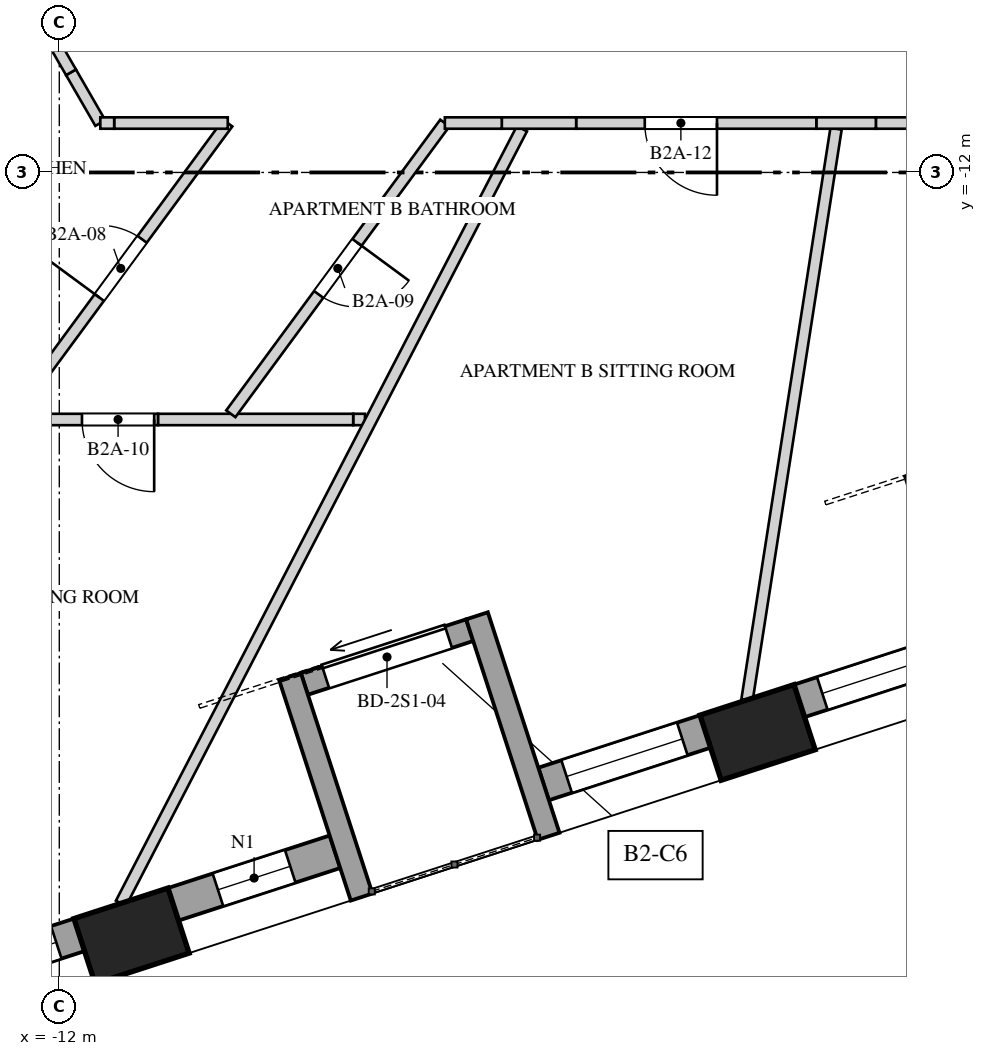
"""IFC4 building model, lengths in metres.
Left out: names, types, materials, properties, quantities, classifications, styles, units other than length and angle.
Written with IfcOpenShell. Run it as: python <this file> out.ifc"""

import sys

from ifc_helpers import new_model, si_unit, direction, frame, frame_2d, origin, origin_2d, place, context, subcontext, project, spatial, polyline, rectangle, outline, extrude, element, fill, save


model = new_model("IFC4")
c1 = context("Model", 3, precision=1e-05, world=origin(), true_north=direction((0.0, 1.0)))
c2 = subcontext(c1, "Body", "Model", "MODEL_VIEW")
j1 = project(units=[si_unit("LENGTHUNIT", "METRE"), si_unit("PLANEANGLEUNIT", "RADIAN")], contexts=[c1])
p1 = place(None, origin())
s1 = spatial("IfcSite", under=j1, at=p1, CompositionType="ELEMENT")
p2 = place(p1, origin())
s2 = spatial("IfcBuilding", under=s1, at=p2, CompositionType="ELEMENT")
p3 = place(p2, frame((0.0, 0.0, 88.4)))
s3 = spatial("IfcBuildingStorey", under=s2, at=p3, CompositionType="ELEMENT", Elevation=88.4)
for number, where, z_axis, x_axis in (
    (1, (-11.05, -22.043, -0.35), (0.0, 0.0, 1.0), (0.951, 0.309, 0.0)),
    (2, (-2.813, -19.367, -0.35), (0.0, 0.0, 1.0), (0.951, 0.309, 0.0)),
):
    element("IfcColumn", number, at=place(p3, frame(where, z_axis=z_axis, x_axis=x_axis)), inside=s3, PredefinedType="COLUMN", context=c2, shape_type="SweptSolid", body=[
        extrude(rectangle(XDim=1.3, YDim=0.9, at=origin_2d()), origin(), (0.0, 0.0, 1.0), 4.35),
    ])
p4 = place(p3, frame((-13.865, -22.721, 0.0), z_axis=(0.0, 0.0, 1.0), x_axis=(0.951057328329, 0.30901449518, 0.0)))
e3 = element("IfcWall", 3, at=p4, inside=s3, PredefinedType="SOLIDWALL", context=c2, shape_type="SweptSolid", body=[
    extrude(rectangle(XDim=2.237, YDim=0.45, at=frame_2d((1.118, 0.0))), origin(), (0.0, 0.0, 1.0), 3.3),
])
p5 = place(p4, frame((0.318, 0.0, 0.7)))
e4 = element("IfcOpeningElement", 4, at=p5, cuts=e3, PredefinedType="OPENING", context=c2, shape_type="SweptSolid", body=[
    extrude(rectangle(XDim=1.6, YDim=2.3, at=frame_2d((0.8, 1.15))), frame((0.0, 0.235, 0.0), z_axis=(0.0, -1.0, 0.0), x_axis=(1.0, 0.0, 0.0)), (0.0, 0.0, 1.0), 0.47),
])
p6 = place(p3, frame((-10.501, -21.628, 0.0), z_axis=(0.0, 0.0, 1.0), x_axis=(0.951067749801, 0.30898241906, 0.0)))
e5 = element("IfcWall", 5, at=p6, inside=s3, PredefinedType="SOLIDWALL", context=c2, shape_type="SweptSolid", body=[
    extrude(rectangle(XDim=2.237, YDim=0.45, at=frame_2d((1.118, 0.0))), origin(), (0.0, 0.0, 1.0), 3.3),
])
p7 = place(p6, frame((0.618, 0.0, 0.7)))
e6 = element("IfcOpeningElement", 6, at=p7, cuts=e5, PredefinedType="OPENING", context=c2, shape_type="SweptSolid", body=[
    extrude(rectangle(XDim=1.0, YDim=2.3, at=frame_2d((0.5, 1.15))), frame((0.0, 0.235, 0.0), z_axis=(0.0, -1.0, 0.0), x_axis=(1.0, 0.0, 0.0)), (0.0, 0.0, 1.0), 0.47),
])
p8 = place(p3, frame((-5.628, -20.045, 0.0), z_axis=(0.0, 0.0, 1.0), x_axis=(0.951057328329, 0.30901449518, 0.0)))
e7 = element("IfcWall", 7, at=p8, inside=s3, PredefinedType="SOLIDWALL", context=c2, shape_type="SweptSolid", body=[
    extrude(rectangle(XDim=2.237, YDim=0.45, at=frame_2d((1.118, 0.0))), origin(), (0.0, 0.0, 1.0), 3.3),
])
p9 = place(p8, frame((0.318, 0.0, 0.7)))
e8 = element("IfcOpeningElement", 8, at=p9, cuts=e7, PredefinedType="OPENING", context=c2, shape_type="SweptSolid", body=[
    extrude(rectangle(XDim=1.6, YDim=2.3, at=frame_2d((0.8, 1.15))), frame((0.0, 0.235, 0.0), z_axis=(0.0, -1.0, 0.0), x_axis=(1.0, 0.0, 0.0)), (0.0, 0.0, 1.0), 0.47),
])
p10 = place(p3, frame((-2.264, -18.952, 0.0), z_axis=(0.0, 0.0, 1.0), x_axis=(0.951057328329, 0.30901449518, 0.0)))
e9 = element("IfcWall", 9, at=p10, inside=s3, PredefinedType="SOLIDWALL", context=c2, shape_type="SweptSolid", body=[
    extrude(rectangle(XDim=2.237, YDim=0.45, at=frame_2d((1.118, 0.0))), origin(), (0.0, 0.0, 1.0), 3.3),
])
p11 = place(p10, frame((0.318, 0.0, 0.7)))
e10 = element("IfcOpeningElement", 10, at=p11, cuts=e9, PredefinedType="OPENING", context=c2, shape_type="SweptSolid", body=[
    extrude(rectangle(XDim=1.6, YDim=2.3, at=frame_2d((0.8, 1.15))), frame((0.0, 0.235, 0.0), z_axis=(0.0, -1.0, 0.0), x_axis=(1.0, 0.0, 0.0)), (0.0, 0.0, 1.0), 0.47),
])
p12 = place(p3, frame((-8.776, -18.729, 0.0), z_axis=(0.0, 0.0, 1.0), x_axis=(0.951068585107, 0.308979847923, 0.0)))
e11 = element("IfcWall", 11, at=p12, inside=s3, PredefinedType="SOLIDWALL", context=c2, shape_type="SweptSolid", body=[
    extrude(rectangle(XDim=2.287, YDim=0.3, at=frame_2d((1.143, 0.0))), origin(), (0.0, 0.0, 1.0), 3.3),
])
p13 = place(p12, frame((0.293, 0.0, 0.0)))
e12 = element("IfcOpeningElement", 12, at=p13, cuts=e11, PredefinedType="OPENING", context=c2, shape_type="SweptSolid", body=[
    extrude(rectangle(XDim=1.7, YDim=2.4, at=frame_2d((0.85, 1.2))), frame((0.0, 0.16, 0.0), z_axis=(0.0, -1.0, 0.0), x_axis=(1.0, 0.0, 0.0)), (0.0, 0.0, 1.0), 0.32),
])
p14 = place(p3, frame((-8.022, -21.533, 0.0), z_axis=(0.0, 0.0, 1.0), x_axis=(-0.308990138358, 0.951065241925, 0.0)))
e13 = element("IfcWall", 13, at=p14, inside=s3, PredefinedType="SOLIDWALL", context=c2, shape_type="SweptSolid", body=[
    extrude(rectangle(XDim=3.05, YDim=0.3, at=frame_2d((1.525, 0.0))), origin(), (0.0, 0.0, 1.0), 3.3),
])
for number, where, z_axis, x_axis in (
    (14, (-5.562, -20.734, 0.0), (0.0, 0.0, 1.0), (-0.309, 0.951, 0.0)),
    (15, (0.214, -18.857, 0.0), (0.0, 0.0, 1.0), (-0.309, 0.951, 0.0)),
):
    element("IfcWall", number, at=place(p3, frame(where, z_axis=z_axis, x_axis=x_axis)), inside=s3, PredefinedType="SOLIDWALL", context=c2, shape_type="SweptSolid", body=[
        extrude(rectangle(XDim=3.05, YDim=0.3, at=frame_2d((1.525, 0.0))), origin(), (0.0, 0.0, 1.0), 3.3),
    ])
p15 = place(p3, frame((-12.599, -15.175, 0.0), z_axis=(0.0, 0.0, 1.0), x_axis=(0.592829004129, 0.805328362758, 0.0)))
e16 = element("IfcWall", 16, at=p15, inside=s3, PredefinedType="PARTITIONING", context=c2, shape_type="SweptSolid", body=[
    extrude(rectangle(XDim=4.75, YDim=0.15, at=frame_2d((2.375, 0.0))), origin(), (0.0, 0.0, 1.0), 3.65),
])
p16 = place(p15, frame((1.9, 0.0, 0.0)))
e17 = element("IfcOpeningElement", 17, at=p16, cuts=e16, PredefinedType="OPENING", context=c2, shape_type="SweptSolid", body=[
    extrude(rectangle(XDim=0.95, YDim=2.4, at=frame_2d((0.475, 1.2))), frame((0.0, 0.085, 0.0), z_axis=(0.0, -1.0, 0.0), x_axis=(1.0, 0.0, 0.0)), (0.0, 0.0, 1.0), 0.17),
])
p17 = place(p3, frame((-11.46, -11.35, 0.0), z_axis=(0.0, 0.0, 1.0), x_axis=(-0.49974986996, 0.866169768276, 0.0)))
e18 = element("IfcWall", 18, at=p17, inside=s3, PredefinedType="PARTITIONING", context=c2, shape_type="SweptSolid", body=[
    extrude(rectangle(XDim=0.771, YDim=0.15, at=frame_2d((0.385, 0.0))), origin(), (0.0, 0.0, 1.0), 2.55),
])
p18 = place(p3, frame((-11.846, -10.682, 0.0), z_axis=(0.0, 0.0, 1.0), x_axis=(-0.500067425712, 0.865986472032, 0.0)))
e19 = element("IfcWall", 19, at=p18, inside=s3, PredefinedType="PARTITIONING", context=c2, shape_type="SweptSolid", body=[
    extrude(rectangle(XDim=2.226, YDim=0.15, at=frame_2d((1.113, 0.0))), origin(), (0.0, 0.0, 1.0), 3.65),
])
p19 = place(p3, frame((-9.784, -11.35, 0.0), z_axis=(0.0, 0.0, 1.0), x_axis=(-1.0, 0.0, 0.0)))
e20 = element("IfcWall", 20, at=p19, inside=s3, PredefinedType="PARTITIONING", context=c2, shape_type="SweptSolid", body=[
    extrude(rectangle(XDim=1.494, YDim=0.15, at=frame_2d((0.747, 0.0))), origin(), (0.0, 0.0, 1.0), 3.65),
])
p20 = place(p3, frame((-11.278, -11.35, 0.0), z_axis=(0.0, 0.0, 1.0), x_axis=(-1.0, 0.0, 0.0)))
e21 = element("IfcWall", 21, at=p20, inside=s3, PredefinedType="PARTITIONING", context=c2, shape_type="SweptSolid", body=[
    extrude(rectangle(XDim=0.182, YDim=0.15, at=frame_2d((0.091, 0.0))), origin(), (0.0, 0.0, 1.0), 2.55),
])
p21 = place(p3, frame((-7.978, -15.25, 0.0), z_axis=(0.0, 0.0, 1.0), x_axis=(-1.0, 0.0, 0.0)))
e22 = element("IfcWall", 22, at=p21, inside=s3, PredefinedType="PARTITIONING", context=c2, shape_type="SweptSolid", body=[
    extrude(rectangle(XDim=0.155, YDim=0.15, at=frame_2d((0.078, 0.0))), origin(), (0.0, 0.0, 1.0), 2.55),
])
p22 = place(p3, frame((-8.134, -15.25, 0.0), z_axis=(0.0, 0.0, 1.0), x_axis=(-1.0, 0.0, 0.0)))
e23 = element("IfcWall", 23, at=p22, inside=s3, PredefinedType="PARTITIONING", context=c2, shape_type="SweptSolid", body=[
    extrude(rectangle(XDim=2.568, YDim=0.15, at=frame_2d((1.284, 0.0))), origin(), (0.0, 0.0, 1.0), 3.65),
])
p23 = place(p3, frame((-10.702, -15.25, 0.0), z_axis=(0.0, 0.0, 1.0), x_axis=(-1.0, 0.0, 0.0)))
e24 = element("IfcWall", 24, at=p23, inside=s3, PredefinedType="PARTITIONING", context=c2, shape_type="SweptSolid", body=[
    extrude(outline(polyline([(0.0, 0.0), (1.601, 0.0), (1.601, 2.55), (0.497, 2.55), (0.497, 3.65), (0.0, 3.65), (0.0, 0.0)])), frame((0.0, 0.075, 0.0), z_axis=(0.0, -1.0, 0.0), x_axis=(1.0, 0.0, 0.0)), (0.0, 0.0, 1.0), 0.15),
])
p24 = place(p23, frame((0.05, 0.0, 0.0)))
e25 = element("IfcOpeningElement", 25, at=p24, cuts=e24, PredefinedType="OPENING", context=c2, shape_type="SweptSolid", body=[
    extrude(rectangle(XDim=0.95, YDim=2.4, at=frame_2d((0.475, 1.2))), frame((0.0, 0.085, 0.0), z_axis=(0.0, -1.0, 0.0), x_axis=(1.0, 0.0, 0.0)), (0.0, 0.0, 1.0), 0.17),
])
p25 = place(p3, frame((-6.927, -11.35, 0.0), z_axis=(0.0, 0.0, 1.0), x_axis=(-0.592862340114, -0.805303821967, 0.0)))
e26 = element("IfcWall", 26, at=p25, inside=s3, PredefinedType="PARTITIONING", context=c2, shape_type="SweptSolid", body=[
    extrude(rectangle(XDim=4.75, YDim=0.15, at=frame_2d((2.375, 0.0))), origin(), (0.0, 0.0, 1.0), 3.65),
])
p26 = place(p25, frame((1.95, 0.0, 0.0)))
e27 = element("IfcOpeningElement", 27, at=p26, cuts=e26, PredefinedType="OPENING", context=c2, shape_type="SweptSolid", body=[
    extrude(rectangle(XDim=0.85, YDim=2.4, at=frame_2d((0.425, 1.2))), frame((0.0, 0.085, 0.0), z_axis=(0.0, -1.0, 0.0), x_axis=(1.0, 0.0, 0.0)), (0.0, 0.0, 1.0), 0.17),
])
p27 = place(p3, frame((-5.914, -11.425, 0.0), z_axis=(0.0, 0.0, 1.0), x_axis=(-0.45968915988, -0.888079881705, 0.0)))
e28 = element("IfcWall", 28, at=p27, inside=s3, PredefinedType="PARTITIONING", context=c2, shape_type="SweptSolid", body=[
    extrude(rectangle(XDim=11.474, YDim=0.15, at=frame_2d((5.737, 0.0))), origin(), (0.0, 0.0, 1.0), 2.55),
])
p28 = place(p3, frame((-1.781, -11.425, 0.0), z_axis=(0.0, 0.0, 1.0), x_axis=(-0.153998853513, -0.988071026352, 0.0)))
e29 = element("IfcWall", 29, at=p28, inside=s3, PredefinedType="PARTITIONING", context=c2, shape_type="SweptSolid", body=[
    extrude(rectangle(XDim=7.605, YDim=0.15, at=frame_2d((3.802, 0.0))), origin(), (0.0, 0.0, 1.0), 2.75),
])
p29 = place(p3, frame((3.333, -11.35, 0.0), z_axis=(0.0, 0.0, 1.0), x_axis=(-1.0, 0.0, 0.0)))
e30 = element("IfcWall", 30, at=p29, inside=s3, PredefinedType="PARTITIONING", context=c2, shape_type="SweptSolid", body=[
    extrude(rectangle(XDim=4.59, YDim=0.15, at=frame_2d((2.295, 0.0))), origin(), (0.0, 0.0, 1.0), 3.65),
])
p30 = place(p29, frame((1.9, 0.0, 0.0)))
e31 = element("IfcOpeningElement", 31, at=p30, cuts=e30, PredefinedType="OPENING", context=c2, shape_type="SweptSolid", body=[
    extrude(rectangle(XDim=0.95, YDim=2.4, at=frame_2d((0.475, 1.2))), frame((0.0, 0.085, 0.0), z_axis=(0.0, -1.0, 0.0), x_axis=(1.0, 0.0, 0.0)), (0.0, 0.0, 1.0), 0.17),
])
p31 = place(p3, frame((-1.257, -11.35, 0.0), z_axis=(0.0, 0.0, 1.0), x_axis=(-1.0, 0.0, 0.0)))
e32 = element("IfcWall", 32, at=p31, inside=s3, PredefinedType="PARTITIONING", context=c2, shape_type="SweptSolid", body=[
    extrude(rectangle(XDim=0.783, YDim=0.15, at=frame_2d((0.392, 0.0))), origin(), (0.0, 0.0, 1.0), 2.75),
])
p32 = place(p3, frame((-2.04, -11.35, 0.0), z_axis=(0.0, 0.0, 1.0), x_axis=(-1.0, 0.0, 0.0)))
e33 = element("IfcWall", 33, at=p32, inside=s3, PredefinedType="PARTITIONING", context=c2, shape_type="SweptSolid", body=[
    extrude(rectangle(XDim=3.16, YDim=0.15, at=frame_2d((1.58, 0.0))), origin(), (0.0, 0.0, 1.0), 3.65),
])
p33 = place(p32, frame((1.307, 0.0, 0.0)))
e34 = element("IfcOpeningElement", 34, at=p33, cuts=e33, PredefinedType="OPENING", context=c2, shape_type="SweptSolid", body=[
    extrude(rectangle(XDim=0.95, YDim=2.4, at=frame_2d((0.475, 1.2))), frame((0.0, 0.085, 0.0), z_axis=(0.0, -1.0, 0.0), x_axis=(1.0, 0.0, 0.0)), (0.0, 0.0, 1.0), 0.17),
])
p34 = place(p3, frame((-5.2, -11.35, 0.0), z_axis=(0.0, 0.0, 1.0), x_axis=(-1.0, 0.0, 0.0)))
e35 = element("IfcWall", 35, at=p34, inside=s3, PredefinedType="PARTITIONING", context=c2, shape_type="SweptSolid", body=[
    extrude(rectangle(XDim=0.979, YDim=0.15, at=frame_2d((0.489, 0.0))), origin(), (0.0, 0.0, 1.0), 2.55),
])
p35 = place(p3, frame((-6.179, -11.35, 0.0), z_axis=(0.0, 0.0, 1.0), x_axis=(-1.0, 0.0, 0.0)))
e36 = element("IfcWall", 36, at=p35, inside=s3, PredefinedType="PARTITIONING", context=c2, shape_type="SweptSolid", body=[
    extrude(rectangle(XDim=0.749, YDim=0.15, at=frame_2d((0.375, 0.0))), origin(), (0.0, 0.0, 1.0), 3.65),
])
p36 = place(p5, origin())
e37 = element("IfcWindow", 37, at=p36, inside=s3, PartitioningType="SINGLE_PANEL", PredefinedType="WINDOW", context=c2, shape_type="SweptSolid", body=[
    extrude(rectangle(XDim=1.6, YDim=2.3, at=frame_2d((0.8, 1.15))), frame((0.0, 0.03, 0.0), z_axis=(0.0, -1.0, 0.0), x_axis=(1.0, 0.0, 0.0)), (0.0, 0.0, 1.0), 0.06),
])
fill(e4, e37)
p37 = place(p7, origin())
e38 = element("IfcWindow", 38, at=p37, inside=s3, PartitioningType="SINGLE_PANEL", PredefinedType="WINDOW", context=c2, shape_type="SweptSolid", body=[
    extrude(rectangle(XDim=1.0, YDim=2.3, at=frame_2d((0.5, 1.15))), frame((0.0, 0.03, 0.0), z_axis=(0.0, -1.0, 0.0), x_axis=(1.0, 0.0, 0.0)), (0.0, 0.0, 1.0), 0.06),
])
fill(e6, e38)
p38 = place(p9, origin())
e39 = element("IfcWindow", 39, at=p38, inside=s3, PartitioningType="SINGLE_PANEL", PredefinedType="WINDOW", context=c2, shape_type="SweptSolid", body=[
    extrude(rectangle(XDim=1.6, YDim=2.3, at=frame_2d((0.8, 1.15))), frame((0.0, 0.03, 0.0), z_axis=(0.0, -1.0, 0.0), x_axis=(1.0, 0.0, 0.0)), (0.0, 0.0, 1.0), 0.06),
])
fill(e8, e39)
p39 = place(p11, origin())
e40 = element("IfcWindow", 40, at=p39, inside=s3, PartitioningType="SINGLE_PANEL", PredefinedType="WINDOW", context=c2, shape_type="SweptSolid", body=[
    extrude(rectangle(XDim=1.6, YDim=2.3, at=frame_2d((0.8, 1.15))), frame((0.0, 0.03, 0.0), z_axis=(0.0, -1.0, 0.0), x_axis=(1.0, 0.0, 0.0)), (0.0, 0.0, 1.0), 0.06),
])
fill(e10, e40)
p40 = place(p13, origin())
e41 = element("IfcDoor", 41, at=p40, inside=s3, OperationType="SLIDING_TO_LEFT", PredefinedType="DOOR", context=c2, shape_type="SweptSolid", body=[
    extrude(rectangle(XDim=1.7, YDim=2.4, at=frame_2d((0.85, 1.2))), frame((0.0, 0.025, 0.0), z_axis=(0.0, -1.0, 0.0), x_axis=(1.0, 0.0, 0.0)), (0.0, 0.0, 1.0), 0.05),
])
fill(e12, e41)
p41 = place(p16, origin())
e42 = element("IfcDoor", 42, at=p41, inside=s3, OperationType="SINGLE_SWING_RIGHT", PredefinedType="DOOR", context=c2, shape_type="SweptSolid", body=[
    extrude(rectangle(XDim=0.95, YDim=2.4, at=frame_2d((0.475, 1.2))), frame((0.0, 0.025, 0.0), z_axis=(0.0, -1.0, 0.0), x_axis=(1.0, 0.0, 0.0)), (0.0, 0.0, 1.0), 0.05),
])
fill(e17, e42)
p42 = place(p26, origin())
e43 = element("IfcDoor", 43, at=p42, inside=s3, OperationType="SINGLE_SWING_LEFT", PredefinedType="DOOR", context=c2, shape_type="SweptSolid", body=[
    extrude(rectangle(XDim=0.85, YDim=2.4, at=frame_2d((0.425, 1.2))), frame((0.0, 0.025, 0.0), z_axis=(0.0, -1.0, 0.0), x_axis=(1.0, 0.0, 0.0)), (0.0, 0.0, 1.0), 0.05),
])
fill(e27, e43)
p43 = place(p24, origin())
e44 = element("IfcDoor", 44, at=p43, inside=s3, OperationType="SINGLE_SWING_RIGHT", PredefinedType="DOOR", context=c2, shape_type="SweptSolid", body=[
    extrude(rectangle(XDim=0.95, YDim=2.4, at=frame_2d((0.475, 1.2))), frame((0.0, 0.025, 0.0), z_axis=(0.0, -1.0, 0.0), x_axis=(1.0, 0.0, 0.0)), (0.0, 0.0, 1.0), 0.05),
])
fill(e25, e44)
p44 = place(p33, origin())
e45 = element("IfcDoor", 45, at=p44, inside=s3, OperationType="SINGLE_SWING_RIGHT", PredefinedType="DOOR", context=c2, shape_type="SweptSolid", body=[
    extrude(rectangle(XDim=0.95, YDim=2.4, at=frame_2d((0.475, 1.2))), frame((0.0, 0.025, 0.0), z_axis=(0.0, -1.0, 0.0), x_axis=(1.0, 0.0, 0.0)), (0.0, 0.0, 1.0), 0.05),
])
fill(e34, e45)
save(model, sys.argv[1])
